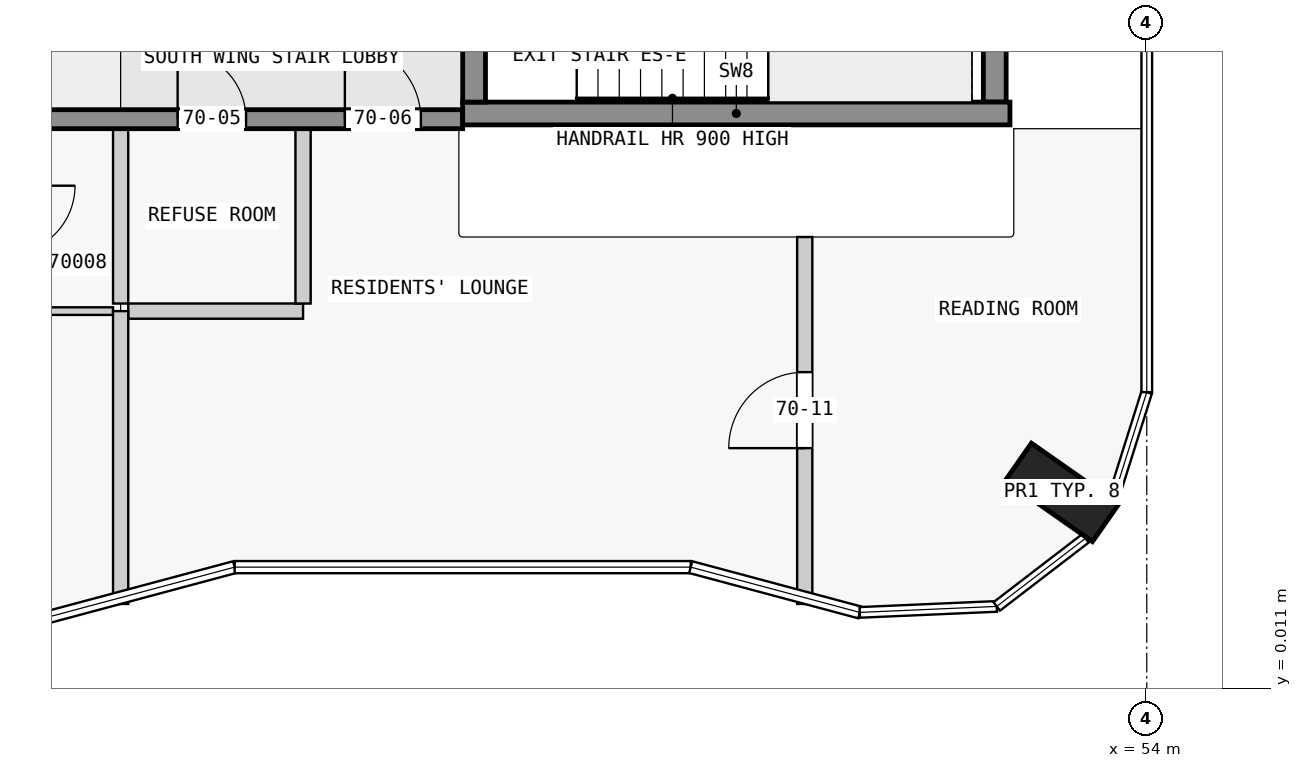
"""IFC4 building model, lengths in metres.
Left out: names, types, materials, properties, quantities, classifications, styles, units other than length and angle.
Written with IfcOpenShell. Run it as: python <this file> out.ifc"""

import sys

from ifc_helpers import new_model, si_unit, direction, frame, frame_2d, origin, origin_2d, place, context, subcontext, project, spatial, rectangle, extrude, element, fill, save


model = new_model("IFC4")
c1 = context("Model", 3, precision=1e-05, world=origin(), true_north=direction((0.0, 1.0)))
c2 = subcontext(c1, "Body", "Model", "MODEL_VIEW")
j1 = project(units=[si_unit("LENGTHUNIT", "METRE"), si_unit("PLANEANGLEUNIT", "RADIAN")], contexts=[c1])
p1 = place(None, origin())
s1 = spatial("IfcSite", under=j1, at=p1, CompositionType="ELEMENT")
p2 = place(p1, origin())
s2 = spatial("IfcBuilding", under=s1, at=p2, CompositionType="ELEMENT")
p3 = place(p2, frame((0.0, 0.0, 266.9)))
s3 = spatial("IfcBuildingStorey", under=s2, at=p3, CompositionType="ELEMENT", Elevation=266.9)
p4 = place(p3, frame((52.884, 2.59, 0.0), z_axis=(0.0, 0.0, 1.0), x_axis=(0.573542637991, 0.819175709117, 0.0)))
e1 = element("IfcColumn", 1, at=p4, inside=s3, PredefinedType="COLUMN", context=c2, shape_type="SweptSolid", body=[
    extrude(rectangle(XDim=0.6, YDim=1.4, at=origin_2d()), origin(), (0.0, 0.0, 1.0), 3.5),
])
p5 = place(p3, frame((45.15, 7.725, 0.0), z_axis=(0.0, 0.0, 1.0), x_axis=(0.0, 1.0, 0.0)))
e2 = element("IfcWall", 2, at=p5, inside=s3, PredefinedType="SHEAR", context=c2, shape_type="SweptSolid", body=[
    extrude(rectangle(XDim=2.55, YDim=0.3, at=frame_2d((1.275, 0.0))), origin(), (0.0, 0.0, 1.0), 3.5),
])
p6 = place(p5, frame((0.725, 0.0, 0.0)))
e3 = element("IfcOpeningElement", 3, at=p6, cuts=e2, PredefinedType="OPENING", context=c2, shape_type="SweptSolid", body=[
    extrude(rectangle(XDim=1.1, YDim=2.1, at=frame_2d((0.55, 1.05))), frame((0.0, 0.16, 0.0), z_axis=(0.0, -1.0, 0.0), x_axis=(1.0, 0.0, 0.0)), (0.0, 0.0, 1.0), 0.32),
])
p7 = place(p3, frame((52.0, 7.725, 0.0), z_axis=(0.0, 0.0, 1.0), x_axis=(0.0, 1.0, 0.0)))
e4 = element("IfcWall", 4, at=p7, inside=s3, PredefinedType="SHEAR", context=c2, shape_type="SweptSolid", body=[
    extrude(rectangle(XDim=2.55, YDim=0.3, at=frame_2d((1.275, 0.0))), origin(), (0.0, 0.0, 1.0), 3.5),
])
p8 = place(p3, frame((45.0, 7.575, 0.0), z_axis=(0.0, 0.0, 1.0), x_axis=(1.0, 0.0, 0.0)))
e5 = element("IfcWall", 5, at=p8, inside=s3, PredefinedType="SHEAR", context=c2, shape_type="SweptSolid", body=[
    extrude(rectangle(XDim=7.2, YDim=0.3, at=frame_2d((3.6, 0.0))), origin(), (0.0, 0.0, 1.0), 3.5),
])
p9 = place(p3, frame((22.5, 7.5, 0.0), z_axis=(0.0, 0.0, 1.0), x_axis=(1.0, 0.0, 0.0)))
e6 = element("IfcWall", 6, at=p9, inside=s3, PredefinedType="SHEAR", context=c2, shape_type="SweptSolid", body=[
    extrude(rectangle(XDim=22.5, YDim=0.25, at=frame_2d((11.25, 0.0))), origin(), (0.0, 0.0, 1.0), 3.25),
])
p10 = place(p9, frame((1.75, 0.0, 0.0)))
e7 = element("IfcOpeningElement", 7, at=p10, cuts=e6, PredefinedType="OPENING", context=c2, shape_type="SweptSolid", body=[
    extrude(rectangle(XDim=1.0, YDim=2.1, at=frame_2d((0.5, 1.05))), frame((0.0, 0.135, 0.0), z_axis=(0.0, -1.0, 0.0), x_axis=(1.0, 0.0, 0.0)), (0.0, 0.0, 1.0), 0.27),
])
p11 = place(p9, frame((6.25, 0.0, 0.0)))
e8 = element("IfcOpeningElement", 8, at=p11, cuts=e6, PredefinedType="OPENING", context=c2, shape_type="SweptSolid", body=[
    extrude(rectangle(XDim=1.0, YDim=2.1, at=frame_2d((0.5, 1.05))), frame((0.0, 0.135, 0.0), z_axis=(0.0, -1.0, 0.0), x_axis=(1.0, 0.0, 0.0)), (0.0, 0.0, 1.0), 0.27),
])
p12 = place(p9, frame((10.35, 0.0, 0.0)))
e9 = element("IfcOpeningElement", 9, at=p12, cuts=e6, PredefinedType="OPENING", context=c2, shape_type="SweptSolid", body=[
    extrude(rectangle(XDim=1.8, YDim=2.1, at=frame_2d((0.9, 1.05))), frame((0.0, 0.135, 0.0), z_axis=(0.0, -1.0, 0.0), x_axis=(1.0, 0.0, 0.0)), (0.0, 0.0, 1.0), 0.27),
])
p13 = place(p9, frame((15.25, 0.0, 0.0)))
e10 = element("IfcOpeningElement", 10, at=p13, cuts=e6, PredefinedType="OPENING", context=c2, shape_type="SweptSolid", body=[
    extrude(rectangle(XDim=1.0, YDim=2.1, at=frame_2d((0.5, 1.05))), frame((0.0, 0.135, 0.0), z_axis=(0.0, -1.0, 0.0), x_axis=(1.0, 0.0, 0.0)), (0.0, 0.0, 1.0), 0.27),
])
p14 = place(p9, frame((18.75, 0.0, 0.0)))
e11 = element("IfcOpeningElement", 11, at=p14, cuts=e6, PredefinedType="OPENING", context=c2, shape_type="SweptSolid", body=[
    extrude(rectangle(XDim=0.9, YDim=2.1, at=frame_2d((0.45, 1.05))), frame((0.0, 0.135, 0.0), z_axis=(0.0, -1.0, 0.0), x_axis=(1.0, 0.0, 0.0)), (0.0, 0.0, 1.0), 0.27),
])
p15 = place(p9, frame((20.95, 0.0, 0.0)))
e12 = element("IfcOpeningElement", 12, at=p15, cuts=e6, PredefinedType="OPENING", context=c2, shape_type="SweptSolid", body=[
    extrude(rectangle(XDim=1.0, YDim=2.1, at=frame_2d((0.5, 1.05))), frame((0.0, 0.135, 0.0), z_axis=(0.0, -1.0, 0.0), x_axis=(1.0, 0.0, 0.0)), (0.0, 0.0, 1.0), 0.27),
])
p16 = place(p3, frame((39.05, 4.975, 0.0), z_axis=(0.0, 0.0, 1.0), x_axis=(1.0, 0.0, 0.0)))
e13 = element("IfcWall", 13, at=p16, inside=s3, PredefinedType="PARTITIONING", context=c2, shape_type="SweptSolid", body=[
    extrude(rectangle(XDim=1.35, YDim=0.1, at=frame_2d((0.675, 0.0))), origin(), (0.0, 0.0, 1.0), 3.25),
])
p17 = place(p3, frame((40.6, 4.975, 0.0), z_axis=(0.0, 0.0, 1.0), x_axis=(1.0, 0.0, 0.0)))
e14 = element("IfcWall", 14, at=p17, inside=s3, PredefinedType="PARTITIONING", context=c2, shape_type="SweptSolid", body=[
    extrude(rectangle(XDim=2.3, YDim=0.2, at=frame_2d((1.15, 0.0))), origin(), (0.0, 0.0, 1.0), 3.25),
])
p18 = place(p3, frame((40.5, 4.975, 0.0), z_axis=(0.0, 0.0, 1.0), x_axis=(0.0, -1.0, 0.0)))
e15 = element("IfcWall", 15, at=p18, inside=s3, PredefinedType="PARTITIONING", context=c2, shape_type="SweptSolid", body=[
    extrude(rectangle(XDim=3.853, YDim=0.2, at=frame_2d((1.926, 0.0))), origin(), (0.0, 0.0, 1.0), 3.25),
])
for number, where, z_axis, x_axis in (
    (16, (40.5, 5.075, 0.0), (0.0, 0.0, 1.0), (0.0, 1.0, 0.0)),
    (17, (42.9, 5.075, 0.0), (0.0, 0.0, 1.0), (0.0, 1.0, 0.0)),
):
    element("IfcWall", number, at=place(p3, frame(where, z_axis=z_axis, x_axis=x_axis)), inside=s3, PredefinedType="PARTITIONING", context=c2, shape_type="SweptSolid", body=[
        extrude(rectangle(XDim=2.3, YDim=0.2, at=frame_2d((1.15, 0.0))), origin(), (0.0, 0.0, 1.0), 3.25),
    ])
p19 = place(p3, frame((49.5, 1.122, 0.0), z_axis=(0.0, 0.0, 1.0), x_axis=(0.0, 1.0, 0.0)))
e18 = element("IfcWall", 18, at=p19, inside=s3, PredefinedType="PARTITIONING", context=c2, shape_type="SweptSolid", body=[
    extrude(rectangle(XDim=4.828, YDim=0.2, at=frame_2d((2.414, 0.0))), origin(), (0.0, 0.0, 1.0), 3.25),
])
p20 = place(p19, frame((2.05, 0.0, 0.0)))
e19 = element("IfcOpeningElement", 19, at=p20, cuts=e18, PredefinedType="OPENING", context=c2, shape_type="SweptSolid", body=[
    extrude(rectangle(XDim=1.0, YDim=2.1, at=frame_2d((0.5, 1.05))), frame((0.0, 0.11, 0.0), z_axis=(0.0, -1.0, 0.0), x_axis=(1.0, 0.0, 0.0)), (0.0, 0.0, 1.0), 0.22),
])
p21 = place(p14, origin())
e20 = element("IfcDoor", 20, at=p21, inside=s3, OperationType="SINGLE_SWING_RIGHT", PredefinedType="DOOR", context=c2, shape_type="SweptSolid", body=[
    extrude(rectangle(XDim=0.9, YDim=2.1, at=frame_2d((0.45, 1.05))), frame((0.0, 0.025, 0.0), z_axis=(0.0, -1.0, 0.0), x_axis=(1.0, 0.0, 0.0)), (0.0, 0.0, 1.0), 0.05),
])
fill(e11, e20)
p22 = place(p15, origin())
e21 = element("IfcDoor", 21, at=p22, inside=s3, OperationType="SINGLE_SWING_RIGHT", PredefinedType="DOOR", context=c2, shape_type="SweptSolid", body=[
    extrude(rectangle(XDim=1.0, YDim=2.1, at=frame_2d((0.5, 1.05))), frame((0.0, 0.025, 0.0), z_axis=(0.0, -1.0, 0.0), x_axis=(1.0, 0.0, 0.0)), (0.0, 0.0, 1.0), 0.05),
])
fill(e12, e21)
p23 = place(p20, origin())
e22 = element("IfcDoor", 22, at=p23, inside=s3, OperationType="SINGLE_SWING_RIGHT", PredefinedType="DOOR", context=c2, shape_type="SweptSolid", body=[
    extrude(rectangle(XDim=1.0, YDim=2.1, at=frame_2d((0.5, 1.05))), frame((0.0, 0.025, 0.0), z_axis=(0.0, -1.0, 0.0), x_axis=(1.0, 0.0, 0.0)), (0.0, 0.0, 1.0), 0.05),
])
fill(e19, e22)
save(model, sys.argv[1])
